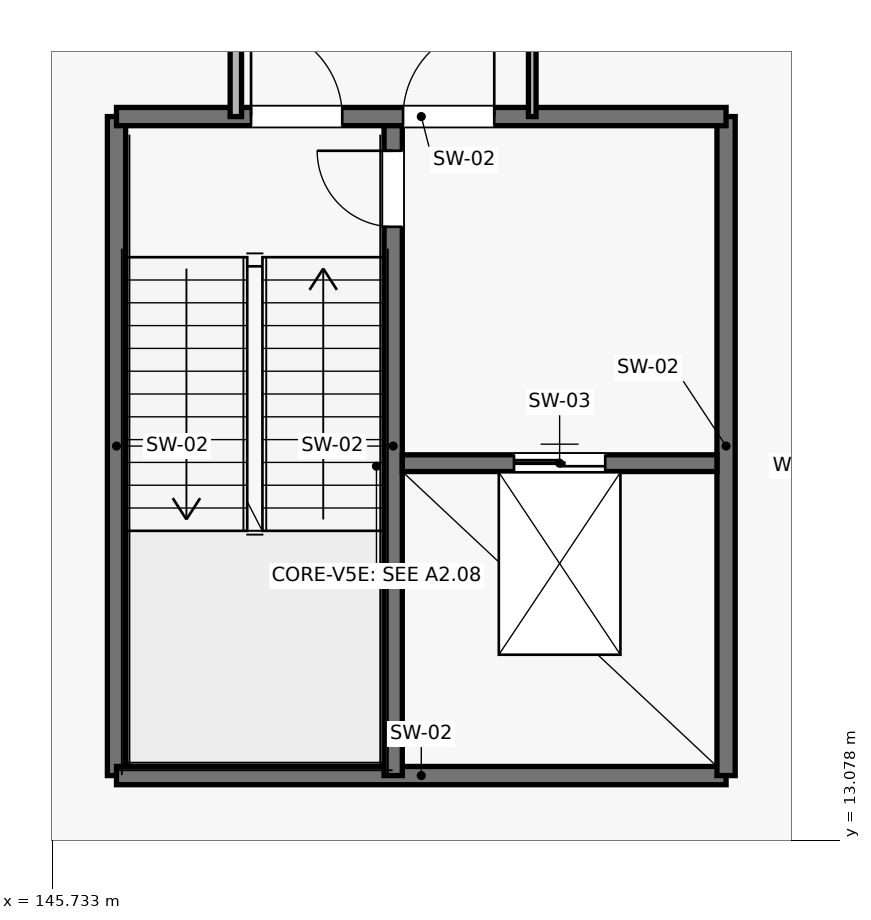
"""IFC4 building model, lengths in metres.
Left out: names, types, materials, properties, quantities, classifications, styles, units other than length and angle.
Written with IfcOpenShell. Run it as: python <this file> out.ifc"""

import sys

from ifc_helpers import new_model, si_unit, direction, frame, frame_2d, origin, place, context, subcontext, project, spatial, rectangle, extrude, element, fill, save


model = new_model("IFC4")
c1 = context("Model", 3, precision=1e-05, world=origin(), true_north=direction((0.0, 1.0)))
c2 = subcontext(c1, "Body", "Model", "MODEL_VIEW")
j1 = project(units=[si_unit("LENGTHUNIT", "METRE"), si_unit("PLANEANGLEUNIT", "RADIAN")], contexts=[c1])
p1 = place(None, origin())
s1 = spatial("IfcSite", under=j1, at=p1, CompositionType="ELEMENT")
p2 = place(p1, origin())
s2 = spatial("IfcBuilding", under=s1, at=p2, CompositionType="ELEMENT")
p3 = place(p2, frame((0.0, 0.0, 11.4)))
s3 = spatial("IfcBuildingStorey", under=s2, at=p3, CompositionType="ELEMENT", Elevation=11.4)
p4 = place(p3, frame((146.58, 22.6, 0.0), z_axis=(0.0, 0.0, 1.0), x_axis=(0.0, -1.0, 0.0)))
e1 = element("IfcWall", 1, at=p4, inside=s3, PredefinedType="SHEAR", context=c2, shape_type="SweptSolid", body=[
    extrude(rectangle(XDim=8.67, YDim=0.24, at=frame_2d((4.335, 0.0))), origin(), (0.0, 0.0, 1.0), 4.45),
])
p5 = place(p3, frame((146.58, 13.93, 0.0), z_axis=(0.0, 0.0, 1.0), x_axis=(1.0, 0.0, 0.0)))
e2 = element("IfcWall", 2, at=p5, inside=s3, PredefinedType="SHEAR", context=c2, shape_type="SweptSolid", body=[
    extrude(rectangle(XDim=8.02, YDim=0.24, at=frame_2d((4.01, 0.0))), origin(), (0.0, 0.0, 1.0), 4.45),
])
p6 = place(p3, frame((150.22, 13.93, 0.0), z_axis=(0.0, 0.0, 1.0), x_axis=(0.0, 1.0, 0.0)))
e3 = element("IfcWall", 3, at=p6, inside=s3, PredefinedType="SHEAR", context=c2, shape_type="SweptSolid", body=[
    extrude(rectangle(XDim=8.67, YDim=0.24, at=frame_2d((4.335, 0.0))), origin(), (0.0, 0.0, 1.0), 4.45),
])
p7 = place(p6, frame((7.22, 0.0, 0.0)))
e4 = element("IfcOpeningElement", 4, at=p7, cuts=e3, PredefinedType="OPENING", context=c2, shape_type="SweptSolid", body=[
    extrude(rectangle(XDim=1.0, YDim=2.2, at=frame_2d((0.5, 1.1))), frame((0.0, 0.135, 0.0), z_axis=(0.0, -1.0, 0.0), x_axis=(1.0, 0.0, 0.0)), (0.0, 0.0, 1.0), 0.27),
])
p8 = place(p3, frame((154.6, 13.93, 0.0), z_axis=(0.0, 0.0, 1.0), x_axis=(0.0, 1.0, 0.0)))
e5 = element("IfcWall", 5, at=p8, inside=s3, PredefinedType="SHEAR", context=c2, shape_type="SweptSolid", body=[
    extrude(rectangle(XDim=8.67, YDim=0.24, at=frame_2d((4.335, 0.0))), origin(), (0.0, 0.0, 1.0), 4.45),
])
p9 = place(p3, frame((146.58, 22.6, 0.0), z_axis=(0.0, 0.0, 1.0), x_axis=(1.0, 0.0, 0.0)))
e6 = element("IfcWall", 6, at=p9, inside=s3, PredefinedType="SHEAR", context=c2, shape_type="SweptSolid", body=[
    extrude(rectangle(XDim=8.02, YDim=0.24, at=frame_2d((4.01, 0.0))), origin(), (0.0, 0.0, 1.0), 4.45),
])
p10 = place(p9, frame((1.77, 0.0, 0.0)))
e7 = element("IfcOpeningElement", 7, at=p10, cuts=e6, PredefinedType="OPENING", context=c2, shape_type="SweptSolid", body=[
    extrude(rectangle(XDim=1.2, YDim=2.2, at=frame_2d((0.6, 1.1))), frame((0.0, 0.135, 0.0), z_axis=(0.0, -1.0, 0.0), x_axis=(1.0, 0.0, 0.0)), (0.0, 0.0, 1.0), 0.27),
])
p11 = place(p9, frame((3.77, 0.0, 0.0)))
e8 = element("IfcOpeningElement", 8, at=p11, cuts=e6, PredefinedType="OPENING", context=c2, shape_type="SweptSolid", body=[
    extrude(rectangle(XDim=1.2, YDim=2.2, at=frame_2d((0.6, 1.1))), frame((0.0, 0.135, 0.0), z_axis=(0.0, -1.0, 0.0), x_axis=(1.0, 0.0, 0.0)), (0.0, 0.0, 1.0), 0.27),
])
p12 = place(p3, frame((150.34, 18.04, 0.0), z_axis=(0.0, 0.0, 1.0), x_axis=(1.0, 0.0, 0.0)))
e9 = element("IfcWall", 9, at=p12, inside=s3, PredefinedType="SHEAR", context=c2, shape_type="SweptSolid", body=[
    extrude(rectangle(XDim=4.14, YDim=0.22, at=frame_2d((2.07, 0.0))), origin(), (0.0, 0.0, 1.0), 4.45),
])
p13 = place(p12, frame((1.47, 0.0, 0.0)))
e10 = element("IfcOpeningElement", 10, at=p13, cuts=e9, PredefinedType="OPENING", context=c2, shape_type="SweptSolid", body=[
    extrude(rectangle(XDim=1.2, YDim=2.2, at=frame_2d((0.6, 1.1))), frame((0.0, 0.125, 0.0), z_axis=(0.0, -1.0, 0.0), x_axis=(1.0, 0.0, 0.0)), (0.0, 0.0, 1.0), 0.25),
])
p14 = place(p3, frame((148.15, 22.6, 0.0), z_axis=(0.0, 0.0, 1.0), x_axis=(0.0, 1.0, 0.0)))
e11 = element("IfcWall", 11, at=p14, inside=s3, PredefinedType="PARTITIONING", context=c2, shape_type="SweptSolid", body=[
    extrude(rectangle(XDim=2.8, YDim=0.15, at=frame_2d((1.4, 0.0))), origin(), (0.0, 0.0, 1.0), 3.483),
])
p15 = place(p3, frame((152.05, 22.6, 0.0), z_axis=(0.0, 0.0, 1.0), x_axis=(0.0, 1.0, 0.0)))
e12 = element("IfcWall", 12, at=p15, inside=s3, PredefinedType="PARTITIONING", context=c2, shape_type="SweptSolid", body=[
    extrude(rectangle(XDim=2.8, YDim=0.1, at=frame_2d((1.4, 0.0))), origin(), (0.0, 0.0, 1.0), 3.483),
])
p16 = place(p10, origin())
e13 = element("IfcDoor", 13, at=p16, inside=s3, OperationType="SINGLE_SWING_LEFT", PredefinedType="DOOR", context=c2, shape_type="SweptSolid", body=[
    extrude(rectangle(XDim=1.2, YDim=2.2, at=frame_2d((0.6, 1.1))), frame((0.0, 0.025, 0.0), z_axis=(0.0, -1.0, 0.0), x_axis=(1.0, 0.0, 0.0)), (0.0, 0.0, 1.0), 0.05),
])
fill(e7, e13)
p17 = place(p11, origin())
e14 = element("IfcDoor", 14, at=p17, inside=s3, OperationType="SINGLE_SWING_RIGHT", PredefinedType="DOOR", context=c2, shape_type="SweptSolid", body=[
    extrude(rectangle(XDim=1.2, YDim=2.2, at=frame_2d((0.6, 1.1))), frame((0.0, 0.025, 0.0), z_axis=(0.0, -1.0, 0.0), x_axis=(1.0, 0.0, 0.0)), (0.0, 0.0, 1.0), 0.05),
])
fill(e8, e14)
p18 = place(p7, origin())
e15 = element("IfcDoor", 15, at=p18, inside=s3, OperationType="SINGLE_SWING_RIGHT", PredefinedType="DOOR", context=c2, shape_type="SweptSolid", body=[
    extrude(rectangle(XDim=1.0, YDim=2.2, at=frame_2d((0.5, 1.1))), frame((0.0, 0.025, 0.0), z_axis=(0.0, -1.0, 0.0), x_axis=(1.0, 0.0, 0.0)), (0.0, 0.0, 1.0), 0.05),
])
fill(e4, e15)
p19 = place(p13, origin())
e16 = element("IfcDoor", 16, at=p19, inside=s3, OperationType="DOUBLE_DOOR_SLIDING", PredefinedType="DOOR", context=c2, shape_type="SweptSolid", body=[
    extrude(rectangle(XDim=1.2, YDim=2.2, at=frame_2d((0.6, 1.1))), frame((0.0, 0.025, 0.0), z_axis=(0.0, -1.0, 0.0), x_axis=(1.0, 0.0, 0.0)), (0.0, 0.0, 1.0), 0.05),
])
fill(e10, e16)
save(model, sys.argv[1])
